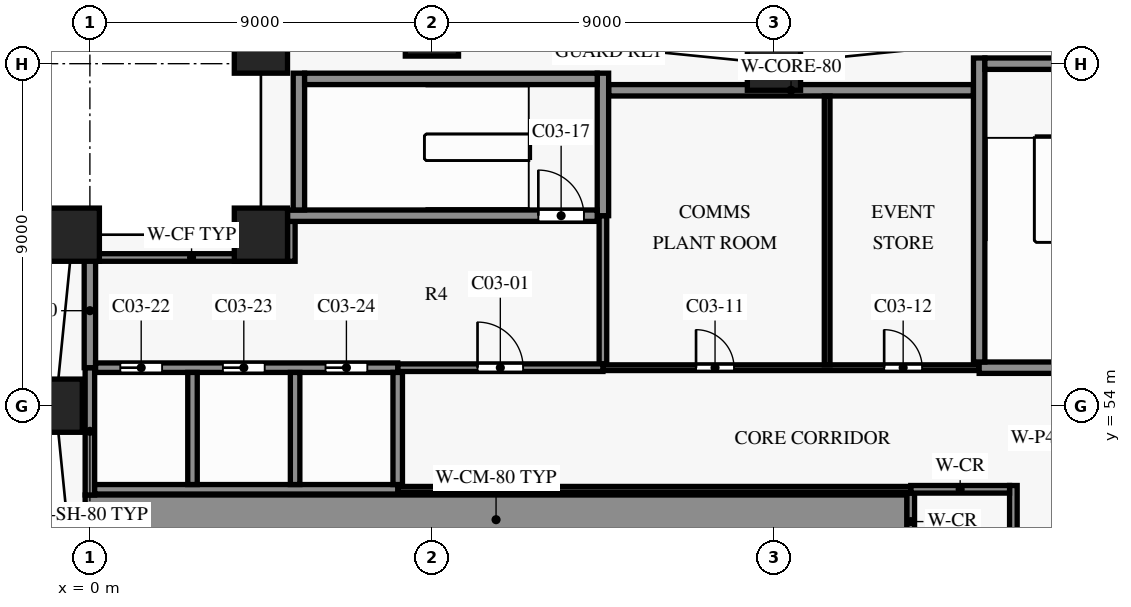
"""IFC4 building model, lengths in metres.
Left out: names, types, materials, properties, quantities, classifications, styles, units other than length and angle.
Written with IfcOpenShell. Run it as: python <this file> out.ifc"""

import sys

from ifc_helpers import new_model, si_unit, direction, frame, frame_2d, origin, origin_2d, place, context, subcontext, project, spatial, rectangle, extrude, element, fill, save


model = new_model("IFC4")
c1 = context("Model", 3, precision=1e-05, world=origin(), true_north=direction((0.0, 1.0)))
c2 = subcontext(c1, "Body", "Model", "MODEL_VIEW")
j1 = project(units=[si_unit("LENGTHUNIT", "METRE"), si_unit("PLANEANGLEUNIT", "RADIAN")], contexts=[c1])
p1 = place(None, origin())
s1 = spatial("IfcSite", under=j1, at=p1, CompositionType="ELEMENT")
p2 = place(p1, origin())
s2 = spatial("IfcBuilding", under=s1, at=p2, CompositionType="ELEMENT")
p3 = place(p2, frame((0.0, 0.0, 7.5)))
s3 = spatial("IfcBuildingStorey", under=s2, at=p3, CompositionType="ELEMENT", Elevation=7.5)
for number, where, z_axis, x_axis in (
    (1, (18.0, 63.0, 0.0), (0.0, 0.0, 1.0), (1.0, 0.0, 0.0)),
    (2, (9.0, 63.9, 0.0), (0.0, 0.0, 1.0), (1.0, 0.0, 0.0)),
    (3, (4.5, 63.45, 0.0), (0.0, 0.0, 1.0), (1.0, 0.0, 0.0)),
    (4, (-0.45, 58.5, 0.0), (0.0, 0.0, 1.0), (1.0, 0.0, 0.0)),
    (5, (-0.9, 54.0, 0.0), (0.0, 0.0, 1.0), (1.0, 0.0, 0.0)),
    (6, (4.5, 58.5, 0.0), (0.0, 0.0, 1.0), (1.0, 0.0, 0.0)),
):
    element("IfcColumn", number, at=place(p3, frame(where, z_axis=z_axis, x_axis=x_axis)), inside=s3, PredefinedType="COLUMN", context=c2, shape_type="SweptSolid", body=[
        extrude(rectangle(XDim=1.4, YDim=1.4, at=origin_2d()), origin(), (0.0, 0.0, 1.0), 7.0),
    ])
p4 = place(p3, frame((-0.125, 51.0, 0.0), z_axis=(0.0, 0.0, 1.0), x_axis=(1.0, 0.0, 0.0)))
e7 = element("IfcWall", 7, at=p4, inside=s3, PredefinedType="SHEAR", context=c2, shape_type="SweptSolid", body=[
    extrude(rectangle(XDim=21.625, YDim=1.3, at=frame_2d((10.812, 0.0))), origin(), (0.0, 0.0, 1.0), 6.7),
])
p5 = place(p3, frame((8.1, 51.8, 0.0), z_axis=(0.0, 0.0, 1.0), x_axis=(1.0, 0.0, 0.0)))
e8 = element("IfcWall", 8, at=p5, inside=s3, PredefinedType="PARTITIONING", context=c2, shape_type="SweptSolid", body=[
    extrude(rectangle(XDim=13.5, YDim=0.15, at=frame_2d((6.75, 0.0))), origin(), (0.0, 0.0, 1.0), 6.7),
])
p6 = place(p3, frame((21.6, 51.8, 0.0), z_axis=(0.0, 0.0, 1.0), x_axis=(1.0, 0.0, 0.0)))
e9 = element("IfcWall", 9, at=p6, inside=s3, PredefinedType="PARTITIONING", context=c2, shape_type="SweptSolid", body=[
    extrude(rectangle(XDim=2.6, YDim=0.2, at=frame_2d((1.3, 0.0))), origin(), (0.0, 0.0, 1.0), 6.7),
])
p7 = place(p3, frame((0.125, 51.8, 0.0), z_axis=(0.0, 0.0, 1.0), x_axis=(1.0, 0.0, 0.0)))
e10 = element("IfcWall", 10, at=p7, inside=s3, PredefinedType="SHEAR", context=c2, shape_type="SweptSolid", body=[
    extrude(rectangle(XDim=7.975, YDim=0.25, at=frame_2d((3.988, 0.0))), origin(), (0.0, 0.0, 1.0), 6.7),
])
p8 = place(p3, frame((8.1, 55.0, 0.0), z_axis=(0.0, 0.0, 1.0), x_axis=(1.0, 0.0, 0.0)))
e11 = element("IfcWall", 11, at=p8, inside=s3, PredefinedType="PARTITIONING", context=c2, shape_type="SweptSolid", body=[
    extrude(rectangle(XDim=5.4, YDim=0.2, at=frame_2d((2.7, 0.0))), origin(), (0.0, 0.0, 1.0), 6.7),
])
p9 = place(p8, frame((2.1, 0.0, 0.0)))
e12 = element("IfcOpeningElement", 12, at=p9, cuts=e11, PredefinedType="OPENING", context=c2, shape_type="SweptSolid", body=[
    extrude(rectangle(XDim=1.2, YDim=2.2, at=frame_2d((0.6, 1.1))), frame((0.0, 0.11, 0.0), z_axis=(0.0, -1.0, 0.0), x_axis=(1.0, 0.0, 0.0)), (0.0, 0.0, 1.0), 0.22),
])
p10 = place(p3, frame((13.5, 55.0, 0.0), z_axis=(0.0, 0.0, 1.0), x_axis=(1.0, 0.0, 0.0)))
e13 = element("IfcWall", 13, at=p10, inside=s3, PredefinedType="PARTITIONING", context=c2, shape_type="SweptSolid", body=[
    extrude(rectangle(XDim=9.9, YDim=0.15, at=frame_2d((4.95, 0.0))), origin(), (0.0, 0.0, 1.0), 6.7),
])
p11 = place(p10, frame((2.45, 0.0, 0.0)))
e14 = element("IfcOpeningElement", 14, at=p11, cuts=e13, PredefinedType="OPENING", context=c2, shape_type="SweptSolid", body=[
    extrude(rectangle(XDim=1.0, YDim=2.1, at=frame_2d((0.5, 1.05))), frame((0.0, 0.085, 0.0), z_axis=(0.0, -1.0, 0.0), x_axis=(1.0, 0.0, 0.0)), (0.0, 0.0, 1.0), 0.17),
])
p12 = place(p10, frame((7.4, 0.0, 0.0)))
e15 = element("IfcOpeningElement", 15, at=p12, cuts=e13, PredefinedType="OPENING", context=c2, shape_type="SweptSolid", body=[
    extrude(rectangle(XDim=1.0, YDim=2.1, at=frame_2d((0.5, 1.05))), frame((0.0, 0.085, 0.0), z_axis=(0.0, -1.0, 0.0), x_axis=(1.0, 0.0, 0.0)), (0.0, 0.0, 1.0), 0.17),
])
p13 = place(p3, frame((0.15, 55.0, 0.0), z_axis=(0.0, 0.0, 1.0), x_axis=(1.0, 0.0, 0.0)))
e16 = element("IfcWall", 16, at=p13, inside=s3, PredefinedType="SHEAR", context=c2, shape_type="SweptSolid", body=[
    extrude(rectangle(XDim=7.95, YDim=0.25, at=frame_2d((3.975, 0.0))), origin(), (0.0, 0.0, 1.0), 6.7),
])
p14 = place(p13, frame((0.65, 0.0, 0.0)))
e17 = element("IfcOpeningElement", 17, at=p14, cuts=e16, PredefinedType="OPENING", context=c2, shape_type="SweptSolid", body=[
    extrude(rectangle(XDim=1.1, YDim=2.1, at=frame_2d((0.55, 1.05))), frame((0.0, 0.135, 0.0), z_axis=(0.0, -1.0, 0.0), x_axis=(1.0, 0.0, 0.0)), (0.0, 0.0, 1.0), 0.27),
])
p15 = place(p13, frame((3.35, 0.0, 0.0)))
e18 = element("IfcOpeningElement", 18, at=p15, cuts=e16, PredefinedType="OPENING", context=c2, shape_type="SweptSolid", body=[
    extrude(rectangle(XDim=1.1, YDim=2.1, at=frame_2d((0.55, 1.05))), frame((0.0, 0.135, 0.0), z_axis=(0.0, -1.0, 0.0), x_axis=(1.0, 0.0, 0.0)), (0.0, 0.0, 1.0), 0.27),
])
p16 = place(p13, frame((6.05, 0.0, 0.0)))
e19 = element("IfcOpeningElement", 19, at=p16, cuts=e16, PredefinedType="OPENING", context=c2, shape_type="SweptSolid", body=[
    extrude(rectangle(XDim=1.1, YDim=2.1, at=frame_2d((0.55, 1.05))), frame((0.0, 0.135, 0.0), z_axis=(0.0, -1.0, 0.0), x_axis=(1.0, 0.0, 0.0)), (0.0, 0.0, 1.0), 0.27),
])
p17 = place(p3, frame((23.4, 55.0, 0.0), z_axis=(0.0, 0.0, 1.0), x_axis=(1.0, 0.0, 0.0)))
e20 = element("IfcWall", 20, at=p17, inside=s3, PredefinedType="SHEAR", context=c2, shape_type="SweptSolid", body=[
    extrude(rectangle(XDim=3.45, YDim=0.3, at=frame_2d((1.725, 0.0))), origin(), (0.0, 0.0, 1.0), 6.7),
])
p18 = place(p3, frame((0.15, 57.9, 0.0), z_axis=(0.0, 0.0, 1.0), x_axis=(1.0, 0.0, 0.0)))
e21 = element("IfcWall", 21, at=p18, inside=s3, PredefinedType="PARTITIONING", context=c2, shape_type="SweptSolid", body=[
    extrude(rectangle(XDim=5.05, YDim=0.2, at=frame_2d((2.525, 0.0))), origin(), (0.0, 0.0, 1.0), 6.7),
])
p19 = place(p3, frame((5.2, 59.0, 0.0), z_axis=(0.0, 0.0, 1.0), x_axis=(1.0, 0.0, 0.0)))
e22 = element("IfcWall", 22, at=p19, inside=s3, PredefinedType="SHEAR", context=c2, shape_type="SweptSolid", body=[
    extrude(rectangle(XDim=8.15, YDim=0.3, at=frame_2d((4.075, 0.0))), origin(), (0.0, 0.0, 1.0), 6.7),
])
p20 = place(p19, frame((6.6, 0.0, 0.0)))
e23 = element("IfcOpeningElement", 23, at=p20, cuts=e22, PredefinedType="OPENING", context=c2, shape_type="SweptSolid", body=[
    extrude(rectangle(XDim=1.2, YDim=2.2, at=frame_2d((0.6, 1.1))), frame((0.0, 0.16, 0.0), z_axis=(0.0, -1.0, 0.0), x_axis=(1.0, 0.0, 0.0)), (0.0, 0.0, 1.0), 0.32),
])
p21 = place(p3, frame((13.65, 62.3, 0.0), z_axis=(0.0, 0.0, 1.0), x_axis=(1.0, 0.0, 0.0)))
e24 = element("IfcWall", 24, at=p21, inside=s3, PredefinedType="SHEAR", context=c2, shape_type="SweptSolid", body=[
    extrude(rectangle(XDim=9.6, YDim=0.3, at=frame_2d((4.8, 0.0))), origin(), (0.0, 0.0, 1.0), 6.7),
])
p22 = place(p3, frame((5.65, 62.6, 0.0), z_axis=(0.0, 0.0, 1.0), x_axis=(1.0, 0.0, 0.0)))
e25 = element("IfcWall", 25, at=p22, inside=s3, PredefinedType="SHEAR", context=c2, shape_type="SweptSolid", body=[
    extrude(rectangle(XDim=7.7, YDim=0.3, at=frame_2d((3.85, 0.0))), origin(), (0.0, 0.0, 1.0), 6.7),
])
p23 = place(p3, frame((23.55, 63.0, 0.0), z_axis=(0.0, 0.0, 1.0), x_axis=(1.0, 0.0, 0.0)))
e26 = element("IfcWall", 26, at=p23, inside=s3, PredefinedType="SHEAR", context=c2, shape_type="SweptSolid", body=[
    extrude(rectangle(XDim=3.3, YDim=0.3, at=frame_2d((1.65, 0.0))), origin(), (0.0, 0.0, 1.0), 6.7),
])
p24 = place(p3, frame((0.0, 55.0, 0.0), z_axis=(0.0, 0.0, 1.0), x_axis=(0.0, 1.0, 0.0)))
e27 = element("IfcWall", 27, at=p24, inside=s3, PredefinedType="SHEAR", context=c2, shape_type="SweptSolid", body=[
    extrude(rectangle(XDim=3.0, YDim=0.3, at=frame_2d((1.5, 0.0))), origin(), (0.0, 0.0, 1.0), 6.7),
])
p25 = place(p3, frame((0.0, 51.65, 0.0), z_axis=(0.0, 0.0, 1.0), x_axis=(0.0, 1.0, 0.0)))
e28 = element("IfcWall", 28, at=p25, inside=s3, PredefinedType="SHEAR", context=c2, shape_type="SweptSolid", body=[
    extrude(rectangle(XDim=3.35, YDim=0.25, at=frame_2d((1.675, 0.0))), origin(), (0.0, 0.0, 1.0), 6.7),
])
p26 = place(p3, frame((2.7, 51.925, 0.0), z_axis=(0.0, 0.0, 1.0), x_axis=(0.0, 1.0, 0.0)))
e29 = element("IfcWall", 29, at=p26, inside=s3, PredefinedType="SHEAR", context=c2, shape_type="SweptSolid", body=[
    extrude(rectangle(XDim=2.95, YDim=0.25, at=frame_2d((1.475, 0.0))), origin(), (0.0, 0.0, 1.0), 6.7),
])
p27 = place(p3, frame((5.3, 57.8, 0.0), z_axis=(0.0, 0.0, 1.0), x_axis=(0.0, 1.0, 0.0)))
e30 = element("IfcWall", 30, at=p27, inside=s3, PredefinedType="PARTITIONING", context=c2, shape_type="SweptSolid", body=[
    extrude(rectangle(XDim=1.05, YDim=0.2, at=frame_2d((0.525, 0.0))), origin(), (0.0, 0.0, 1.0), 6.7),
])
p28 = place(p3, frame((5.4, 51.925, 0.0), z_axis=(0.0, 0.0, 1.0), x_axis=(0.0, 1.0, 0.0)))
e31 = element("IfcWall", 31, at=p28, inside=s3, PredefinedType="SHEAR", context=c2, shape_type="SweptSolid", body=[
    extrude(rectangle(XDim=2.95, YDim=0.25, at=frame_2d((1.475, 0.0))), origin(), (0.0, 0.0, 1.0), 6.7),
])
p29 = place(p3, frame((5.5, 59.15, 0.0), z_axis=(0.0, 0.0, 1.0), x_axis=(0.0, 1.0, 0.0)))
e32 = element("IfcWall", 32, at=p29, inside=s3, PredefinedType="SHEAR", context=c2, shape_type="SweptSolid", body=[
    extrude(rectangle(XDim=3.6, YDim=0.3, at=frame_2d((1.8, 0.0))), origin(), (0.0, 0.0, 1.0), 6.7),
])
p30 = place(p3, frame((8.1, 51.925, 0.0), z_axis=(0.0, 0.0, 1.0), x_axis=(0.0, 1.0, 0.0)))
e33 = element("IfcWall", 33, at=p30, inside=s3, PredefinedType="SHEAR", context=c2, shape_type="SweptSolid", body=[
    extrude(rectangle(XDim=2.95, YDim=0.25, at=frame_2d((1.475, 0.0))), origin(), (0.0, 0.0, 1.0), 6.7),
])
p31 = place(p3, frame((13.5, 55.1, 0.0), z_axis=(0.0, 0.0, 1.0), x_axis=(0.0, 1.0, 0.0)))
e34 = element("IfcWall", 34, at=p31, inside=s3, PredefinedType="PARTITIONING", context=c2, shape_type="SweptSolid", body=[
    extrude(rectangle(XDim=3.9, YDim=0.2, at=frame_2d((1.95, 0.0))), origin(), (0.0, 0.0, 1.0), 6.7),
])
p32 = place(p3, frame((13.5, 59.0, 0.0), z_axis=(0.0, 0.0, 1.0), x_axis=(0.0, 1.0, 0.0)))
e35 = element("IfcWall", 35, at=p32, inside=s3, PredefinedType="SHEAR", context=c2, shape_type="SweptSolid", body=[
    extrude(rectangle(XDim=3.75, YDim=0.3, at=frame_2d((1.875, 0.0))), origin(), (0.0, 0.0, 1.0), 6.7),
])
p33 = place(p3, frame((19.4, 55.075, 0.0), z_axis=(0.0, 0.0, 1.0), x_axis=(0.0, 1.0, 0.0)))
e36 = element("IfcWall", 36, at=p33, inside=s3, PredefinedType="PARTITIONING", context=c2, shape_type="SweptSolid", body=[
    extrude(rectangle(XDim=7.075, YDim=0.15, at=frame_2d((3.538, 0.0))), origin(), (0.0, 0.0, 1.0), 6.7),
])
p34 = place(p3, frame((21.6, 50.2, 0.0), z_axis=(0.0, 0.0, 1.0), x_axis=(0.0, 1.0, 0.0)))
e37 = element("IfcWall", 37, at=p34, inside=s3, PredefinedType="PARTITIONING", context=c2, shape_type="SweptSolid", body=[
    extrude(rectangle(XDim=1.5, YDim=0.2, at=frame_2d((0.75, 0.0))), origin(), (0.0, 0.0, 1.0), 6.7),
])
p35 = place(p3, frame((23.4, 55.15, 0.0), z_axis=(0.0, 0.0, 1.0), x_axis=(0.0, 1.0, 0.0)))
e38 = element("IfcWall", 38, at=p35, inside=s3, PredefinedType="SHEAR", context=c2, shape_type="SweptSolid", body=[
    extrude(rectangle(XDim=8.0, YDim=0.3, at=frame_2d((4.0, 0.0))), origin(), (0.0, 0.0, 1.0), 6.7),
])
p36 = place(p3, frame((24.3, 46.9, 0.0), z_axis=(0.0, 0.0, 1.0), x_axis=(0.0, 1.0, 0.0)))
e39 = element("IfcWall", 39, at=p36, inside=s3, PredefinedType="SHEAR", context=c2, shape_type="SweptSolid", body=[
    extrude(rectangle(XDim=5.0, YDim=0.2, at=frame_2d((2.5, 0.0))), origin(), (0.0, 0.0, 1.0), 6.7),
])
p37 = place(p9, origin())
e40 = element("IfcDoor", 40, at=p37, inside=s3, OperationType="SINGLE_SWING_RIGHT", PredefinedType="DOOR", context=c2, shape_type="SweptSolid", body=[
    extrude(rectangle(XDim=1.2, YDim=2.2, at=frame_2d((0.6, 1.1))), frame((0.0, 0.025, 0.0), z_axis=(0.0, -1.0, 0.0), x_axis=(1.0, 0.0, 0.0)), (0.0, 0.0, 1.0), 0.05),
])
fill(e12, e40)
p38 = place(p11, origin())
e41 = element("IfcDoor", 41, at=p38, inside=s3, OperationType="SINGLE_SWING_LEFT", PredefinedType="DOOR", context=c2, shape_type="SweptSolid", body=[
    extrude(rectangle(XDim=1.0, YDim=2.1, at=frame_2d((0.5, 1.05))), frame((0.0, 0.025, 0.0), z_axis=(0.0, -1.0, 0.0), x_axis=(1.0, 0.0, 0.0)), (0.0, 0.0, 1.0), 0.05),
])
fill(e14, e41)
p39 = place(p12, origin())
e42 = element("IfcDoor", 42, at=p39, inside=s3, OperationType="SINGLE_SWING_RIGHT", PredefinedType="DOOR", context=c2, shape_type="SweptSolid", body=[
    extrude(rectangle(XDim=1.0, YDim=2.1, at=frame_2d((0.5, 1.05))), frame((0.0, 0.025, 0.0), z_axis=(0.0, -1.0, 0.0), x_axis=(1.0, 0.0, 0.0)), (0.0, 0.0, 1.0), 0.05),
])
fill(e15, e42)
p40 = place(p20, origin())
e43 = element("IfcDoor", 43, at=p40, inside=s3, OperationType="SINGLE_SWING_RIGHT", PredefinedType="DOOR", context=c2, shape_type="SweptSolid", body=[
    extrude(rectangle(XDim=1.2, YDim=2.2, at=frame_2d((0.6, 1.1))), frame((0.0, 0.025, 0.0), z_axis=(0.0, -1.0, 0.0), x_axis=(1.0, 0.0, 0.0)), (0.0, 0.0, 1.0), 0.05),
])
fill(e23, e43)
p41 = place(p14, origin())
e44 = element("IfcDoor", 44, at=p41, inside=s3, OperationType="DOUBLE_DOOR_SLIDING", PredefinedType="DOOR", context=c2, shape_type="SweptSolid", body=[
    extrude(rectangle(XDim=1.1, YDim=2.1, at=frame_2d((0.55, 1.05))), frame((0.0, 0.025, 0.0), z_axis=(0.0, -1.0, 0.0), x_axis=(1.0, 0.0, 0.0)), (0.0, 0.0, 1.0), 0.05),
])
fill(e17, e44)
p42 = place(p15, origin())
e45 = element("IfcDoor", 45, at=p42, inside=s3, OperationType="DOUBLE_DOOR_SLIDING", PredefinedType="DOOR", context=c2, shape_type="SweptSolid", body=[
    extrude(rectangle(XDim=1.1, YDim=2.1, at=frame_2d((0.55, 1.05))), frame((0.0, 0.025, 0.0), z_axis=(0.0, -1.0, 0.0), x_axis=(1.0, 0.0, 0.0)), (0.0, 0.0, 1.0), 0.05),
])
fill(e18, e45)
p43 = place(p16, origin())
e46 = element("IfcDoor", 46, at=p43, inside=s3, OperationType="DOUBLE_DOOR_SLIDING", PredefinedType="DOOR", context=c2, shape_type="SweptSolid", body=[
    extrude(rectangle(XDim=1.1, YDim=2.1, at=frame_2d((0.55, 1.05))), frame((0.0, 0.025, 0.0), z_axis=(0.0, -1.0, 0.0), x_axis=(1.0, 0.0, 0.0)), (0.0, 0.0, 1.0), 0.05),
])
fill(e19, e46)
save(model, sys.argv[1])
